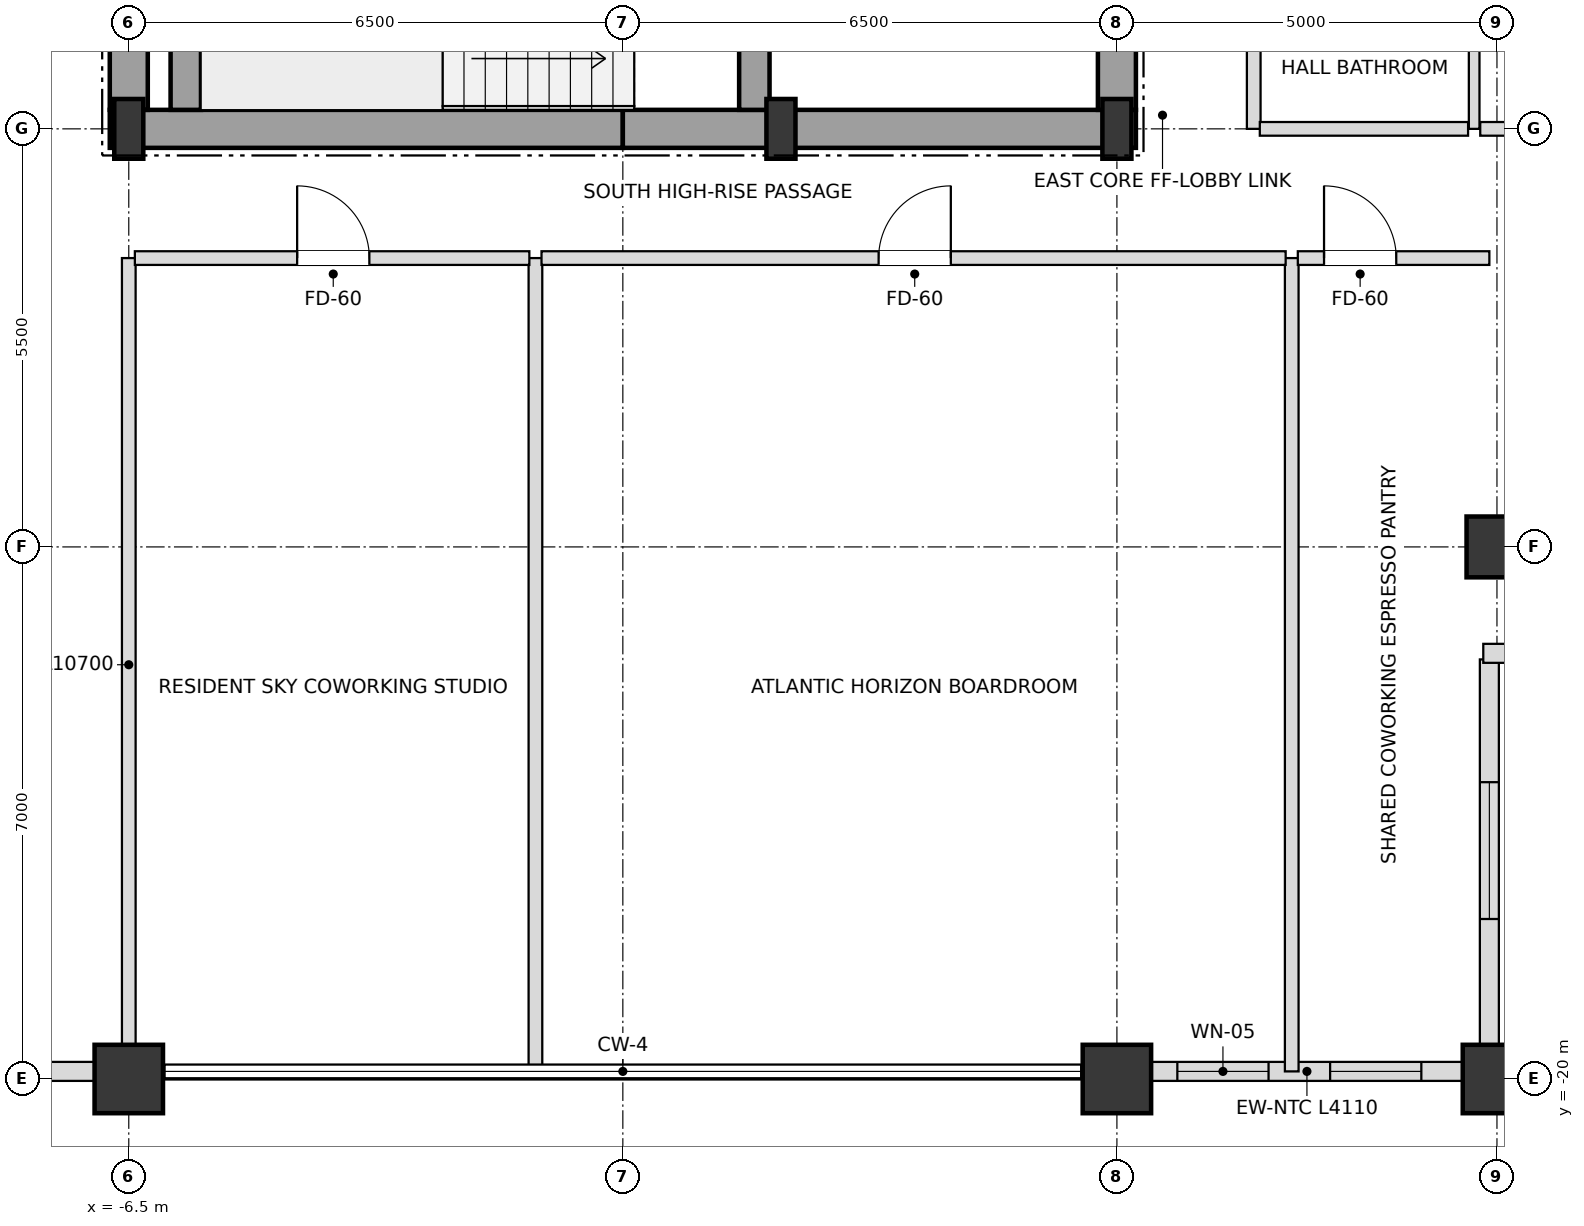
"""IFC4 building model, lengths in metres.
Left out: names, types, materials, properties, quantities, classifications, styles, units other than length and angle.
Written with IfcOpenShell. Run it as: python <this file> out.ifc"""

import sys

from ifc_helpers import new_model, si_unit, direction, frame, frame_2d, origin, origin_2d, place, context, subcontext, project, spatial, rectangle, i_section, extrude, element, fill, save


model = new_model("IFC4")
c1 = context("Model", 3, precision=1e-05, world=origin(), true_north=direction((0.0, 1.0)))
c2 = subcontext(c1, "Body", "Model", "MODEL_VIEW")
j1 = project(units=[si_unit("LENGTHUNIT", "METRE"), si_unit("PLANEANGLEUNIT", "RADIAN")], contexts=[c1])
p1 = place(None, origin())
s1 = spatial("IfcSite", under=j1, at=p1, CompositionType="ELEMENT")
p2 = place(p1, origin())
s2 = spatial("IfcBuilding", under=s1, at=p2, CompositionType="ELEMENT")
p3 = place(p2, frame((0.0, 0.0, 254.7)))
s3 = spatial("IfcBuildingStorey", under=s2, at=p3, CompositionType="ELEMENT", Elevation=254.7)
for number, where, z_axis, x_axis in (
    (1, (-6.5, -7.5, 0.0), (0.0, 0.0, 1.0), (1.0, 0.0, 0.0)),
    (2, (2.08, -7.5, 0.0), (0.0, 0.0, 1.0), (1.0, 0.0, 0.0)),
    (3, (6.5, -7.5, 0.0), (0.0, 0.0, 1.0), (1.0, 0.0, 0.0)),
):
    element("IfcColumn", number, at=place(p3, frame(where, z_axis=z_axis, x_axis=x_axis)), inside=s3, PredefinedType="COLUMN", context=c2, shape_type="SweptSolid", body=[
        extrude(i_section(OverallWidth=0.382, OverallDepth=0.786, WebThickness=0.02, FlangeThickness=0.033, at=origin_2d()), origin(), (0.0, 0.0, 1.0), 3.6),
    ])
for number, where, z_axis, x_axis in (
    (4, (-6.5, -20.0, 0.0), (0.0, 0.0, 1.0), (1.0, 0.0, 0.0)),
    (5, (6.5, -20.0, 0.0), (0.0, 0.0, 1.0), (1.0, 0.0, 0.0)),
    (6, (11.5, -20.0, 0.0), (0.0, 0.0, 1.0), (1.0, 0.0, 0.0)),
):
    element("IfcColumn", number, at=place(p3, frame(where, z_axis=z_axis, x_axis=x_axis)), inside=s3, PredefinedType="USERDEFINED", context=c2, shape_type="SweptSolid", body=[
        extrude(rectangle(XDim=0.9, YDim=0.9, at=origin_2d()), origin(), (0.0, 0.0, 1.0), 3.6),
    ])
p4 = place(p3, frame((11.5, -13.0, 0.0), z_axis=(0.0, 0.0, 1.0), x_axis=(1.0, 0.0, 0.0)))
e7 = element("IfcColumn", 7, at=p4, inside=s3, PredefinedType="COLUMN", context=c2, shape_type="SweptSolid", body=[
    extrude(rectangle(XDim=0.8, YDim=0.8, at=origin_2d()), origin(), (0.0, 0.0, 1.0), 3.6),
])
p5 = place(p3, frame((-11.055, -19.9, 0.0), z_axis=(0.0, 0.0, 1.0), x_axis=(1.0, 0.0, 0.0)))
e8 = element("IfcWall", 8, at=p5, inside=s3, PredefinedType="SOLIDWALL", context=c2, shape_type="SweptSolid", body=[
    extrude(rectangle(XDim=4.11, YDim=0.25, at=frame_2d((2.055, 0.0))), origin(), (0.0, 0.0, 1.0), 2.748),
])
p6 = place(p5, frame((1.155, 0.0, 0.72)))
e9 = element("IfcOpeningElement", 9, at=p6, cuts=e8, PredefinedType="OPENING", context=c2, shape_type="SweptSolid", body=[
    extrude(rectangle(XDim=1.8, YDim=1.68, at=frame_2d((0.9, 0.84))), frame((0.0, 0.135, 0.0), z_axis=(0.0, -1.0, 0.0), x_axis=(1.0, 0.0, 0.0)), (0.0, 0.0, 1.0), 0.27),
])
p7 = place(p3, frame((6.945, -19.9, 0.0), z_axis=(0.0, 0.0, 1.0), x_axis=(1.0, 0.0, 0.0)))
e10 = element("IfcWall", 10, at=p7, inside=s3, PredefinedType="SOLIDWALL", context=c2, shape_type="SweptSolid", body=[
    extrude(rectangle(XDim=4.11, YDim=0.25, at=frame_2d((2.055, 0.0))), origin(), (0.0, 0.0, 1.0), 2.748),
])
p8 = place(p7, frame((0.35, 0.0, 0.72)))
e11 = element("IfcOpeningElement", 11, at=p8, cuts=e10, PredefinedType="OPENING", context=c2, shape_type="SweptSolid", body=[
    extrude(rectangle(XDim=1.2, YDim=1.68, at=frame_2d((0.6, 0.84))), frame((0.0, 0.135, 0.0), z_axis=(0.0, -1.0, 0.0), x_axis=(1.0, 0.0, 0.0)), (0.0, 0.0, 1.0), 0.27),
])
p9 = place(p7, frame((2.36, 0.0, 0.72)))
e12 = element("IfcOpeningElement", 12, at=p9, cuts=e10, PredefinedType="OPENING", context=c2, shape_type="SweptSolid", body=[
    extrude(rectangle(XDim=1.2, YDim=1.68, at=frame_2d((0.6, 0.84))), frame((0.0, 0.135, 0.0), z_axis=(0.0, -1.0, 0.0), x_axis=(1.0, 0.0, 0.0)), (0.0, 0.0, 1.0), 0.27),
])
p10 = place(p3, frame((11.4, -19.82, 0.0), z_axis=(0.0, 0.0, 1.0), x_axis=(0.0, 1.0, 0.0)))
e13 = element("IfcWall", 13, at=p10, inside=s3, PredefinedType="SOLIDWALL", context=c2, shape_type="SweptSolid", body=[
    extrude(rectangle(XDim=5.34, YDim=0.25, at=frame_2d((2.67, 0.0))), origin(), (0.0, 0.0, 1.0), 2.748),
])
p11 = place(p10, frame((1.925, 0.0, 0.72)))
e14 = element("IfcOpeningElement", 14, at=p11, cuts=e13, PredefinedType="OPENING", context=c2, shape_type="SweptSolid", body=[
    extrude(rectangle(XDim=1.8, YDim=1.68, at=frame_2d((0.9, 0.84))), frame((0.0, 0.135, 0.0), z_axis=(0.0, -1.0, 0.0), x_axis=(1.0, 0.0, 0.0)), (0.0, 0.0, 1.0), 0.27),
])
p12 = place(p3, frame((11.32, -14.4, 0.0), z_axis=(0.0, 0.0, 1.0), x_axis=(1.0, 0.0, 0.0)))
e15 = element("IfcWall", 15, at=p12, inside=s3, PredefinedType="SOLIDWALL", context=c2, shape_type="SweptSolid", body=[
    extrude(rectangle(XDim=5.66, YDim=0.25, at=frame_2d((2.83, 0.0))), origin(), (0.0, 0.0, 1.0), 2.748),
])
p13 = place(p12, frame((0.595, 0.0, 0.72)))
e16 = element("IfcOpeningElement", 16, at=p13, cuts=e15, PredefinedType="OPENING", context=c2, shape_type="SweptSolid", body=[
    extrude(rectangle(XDim=1.8, YDim=1.68, at=frame_2d((0.9, 0.84))), frame((0.0, 0.135, 0.0), z_axis=(0.0, -1.0, 0.0), x_axis=(1.0, 0.0, 0.0)), (0.0, 0.0, 1.0), 0.27),
])
p14 = place(p12, frame((3.265, 0.0, 0.72)))
e17 = element("IfcOpeningElement", 17, at=p14, cuts=e15, PredefinedType="OPENING", context=c2, shape_type="SweptSolid", body=[
    extrude(rectangle(XDim=1.8, YDim=1.68, at=frame_2d((0.9, 0.84))), frame((0.0, 0.135, 0.0), z_axis=(0.0, -1.0, 0.0), x_axis=(1.0, 0.0, 0.0)), (0.0, 0.0, 1.0), 0.27),
])
for number, where, z_axis, x_axis in (
    (18, (-6.75, -7.5, 0.0), (0.0, 0.0, 1.0), (1.0, 0.0, 0.0)),
    (19, (0.0, -7.5, 0.0), (0.0, 0.0, 1.0), (1.0, 0.0, 0.0)),
):
    element("IfcWall", number, at=place(p3, frame(where, z_axis=z_axis, x_axis=x_axis)), inside=s3, PredefinedType="SHEAR", context=c2, shape_type="SweptSolid", body=[
        extrude(rectangle(XDim=6.75, YDim=0.5, at=frame_2d((3.375, 0.0))), origin(), (0.0, 0.0, 1.0), 3.38),
    ])
p15 = place(p3, frame((-6.5, -7.25, 0.0), z_axis=(0.0, 0.0, 1.0), x_axis=(0.0, 1.0, 0.0)))
e20 = element("IfcWall", 20, at=p15, inside=s3, PredefinedType="SHEAR", context=c2, shape_type="SweptSolid", body=[
    extrude(rectangle(XDim=3.55, YDim=0.5, at=frame_2d((1.775, 0.0))), origin(), (0.0, 0.0, 1.0), 3.38),
])
p16 = place(p3, frame((6.5, -7.25, 0.0), z_axis=(0.0, 0.0, 1.0), x_axis=(0.0, 1.0, 0.0)))
e21 = element("IfcWall", 21, at=p16, inside=s3, PredefinedType="SHEAR", context=c2, shape_type="SweptSolid", body=[
    extrude(rectangle(XDim=5.75, YDim=0.5, at=frame_2d((2.875, 0.0))), origin(), (0.0, 0.0, 1.0), 3.38),
])
p17 = place(p16, frame((0.85, 0.0, 0.0)))
e22 = element("IfcOpeningElement", 22, at=p17, cuts=e21, PredefinedType="OPENING", context=c2, shape_type="SweptSolid", body=[
    extrude(rectangle(XDim=1.05, YDim=2.15, at=frame_2d((0.525, 1.075))), frame((0.0, 0.26, 0.0), z_axis=(0.0, -1.0, 0.0), x_axis=(1.0, 0.0, 0.0)), (0.0, 0.0, 1.0), 0.52),
])
p18 = place(p3, frame((-5.75, -7.25, 0.0), z_axis=(0.0, 0.0, 1.0), x_axis=(0.0, 1.0, 0.0)))
e23 = element("IfcWall", 23, at=p18, inside=s3, PredefinedType="SHEAR", context=c2, shape_type="SweptSolid", body=[
    extrude(rectangle(XDim=2.9, YDim=0.4, at=frame_2d((1.45, 0.0))), origin(), (0.0, 0.0, 1.0), 3.38),
])
p19 = place(p3, frame((1.73, -7.25, 0.0), z_axis=(0.0, 0.0, 1.0), x_axis=(0.0, 1.0, 0.0)))
e24 = element("IfcWall", 24, at=p19, inside=s3, PredefinedType="SHEAR", context=c2, shape_type="SweptSolid", body=[
    extrude(rectangle(XDim=3.3, YDim=0.4, at=frame_2d((1.65, 0.0))), origin(), (0.0, 0.0, 1.0), 3.38),
])
p20 = place(p19, frame((0.9, 0.0, 0.0)))
e25 = element("IfcOpeningElement", 25, at=p20, cuts=e24, PredefinedType="OPENING", context=c2, shape_type="SweptSolid", body=[
    extrude(rectangle(XDim=1.05, YDim=2.15, at=frame_2d((0.525, 1.075))), frame((0.0, 0.21, 0.0), z_axis=(0.0, -1.0, 0.0), x_axis=(1.0, 0.0, 0.0)), (0.0, 0.0, 1.0), 0.42),
])
p21 = place(p3, frame((-6.5, -19.9, 0.0), z_axis=(0.0, 0.0, 1.0), x_axis=(0.0, 1.0, 0.0)))
e26 = element("IfcWall", 26, at=p21, inside=s3, PredefinedType="PARTITIONING", context=c2, shape_type="SweptSolid", body=[
    extrude(rectangle(XDim=10.7, YDim=0.18, at=frame_2d((5.35, 0.0))), origin(), (0.0, 0.0, 1.0), 2.826),
])
p22 = place(p3, frame((-1.15, -19.9, 0.0), z_axis=(0.0, 0.0, 1.0), x_axis=(0.0, 1.0, 0.0)))
e27 = element("IfcWall", 27, at=p22, inside=s3, PredefinedType="PARTITIONING", context=c2, shape_type="SweptSolid", body=[
    extrude(rectangle(XDim=10.7, YDim=0.18, at=frame_2d((5.35, 0.0))), origin(), (0.0, 0.0, 1.0), 3.018),
])
p23 = place(p3, frame((8.3, -7.5, 0.0), z_axis=(0.0, 0.0, 1.0), x_axis=(0.0, 1.0, 0.0)))
e28 = element("IfcWall", 28, at=p23, inside=s3, PredefinedType="PARTITIONING", context=c2, shape_type="SweptSolid", body=[
    extrude(rectangle(XDim=15.0, YDim=0.18, at=frame_2d((7.5, 0.0))), origin(), (0.0, 0.0, 1.0), 3.38),
])
p24 = place(p23, frame((2.355, 0.0, 0.0)))
e29 = element("IfcOpeningElement", 29, at=p24, cuts=e28, PredefinedType="OPENING", context=c2, shape_type="SweptSolid", body=[
    extrude(rectangle(XDim=0.95, YDim=2.15, at=frame_2d((0.475, 1.075))), frame((0.0, 0.1, 0.0), z_axis=(0.0, -1.0, 0.0), x_axis=(1.0, 0.0, 0.0)), (0.0, 0.0, 1.0), 0.2),
])
p25 = place(p3, frame((8.8, -19.9, 0.0), z_axis=(0.0, 0.0, 1.0), x_axis=(0.0, 1.0, 0.0)))
e30 = element("IfcWall", 30, at=p25, inside=s3, PredefinedType="PARTITIONING", context=c2, shape_type="SweptSolid", body=[
    extrude(rectangle(XDim=10.7, YDim=0.18, at=frame_2d((5.35, 0.0))), origin(), (0.0, 0.0, 1.0), 2.826),
])
p26 = place(p3, frame((11.2, -7.5, 0.0), z_axis=(0.0, 0.0, 1.0), x_axis=(0.0, 1.0, 0.0)))
e31 = element("IfcWall", 31, at=p26, inside=s3, PredefinedType="PARTITIONING", context=c2, shape_type="SweptSolid", body=[
    extrude(rectangle(XDim=15.0, YDim=0.14, at=frame_2d((7.5, 0.0))), origin(), (0.0, 0.0, 1.0), 3.38),
])
p27 = place(p26, frame((3.475, 0.0, 0.0)))
e32 = element("IfcOpeningElement", 32, at=p27, cuts=e31, PredefinedType="OPENING", context=c2, shape_type="SweptSolid", body=[
    extrude(rectangle(XDim=0.95, YDim=2.1, at=frame_2d((0.475, 1.05))), frame((0.0, 0.08, 0.0), z_axis=(0.0, -1.0, 0.0), x_axis=(1.0, 0.0, 0.0)), (0.0, 0.0, 1.0), 0.16),
])
p28 = place(p3, frame((-6.42, -9.2, 0.0), z_axis=(0.0, 0.0, 1.0), x_axis=(1.0, 0.0, 0.0)))
e33 = element("IfcWall", 33, at=p28, inside=s3, PredefinedType="PARTITIONING", context=c2, shape_type="SweptSolid", body=[
    extrude(rectangle(XDim=5.19, YDim=0.18, at=frame_2d((2.595, 0.0))), origin(), (0.0, 0.0, 1.0), 3.38),
])
p29 = place(p28, frame((2.135, 0.0, 0.0)))
e34 = element("IfcOpeningElement", 34, at=p29, cuts=e33, PredefinedType="OPENING", context=c2, shape_type="SweptSolid", body=[
    extrude(rectangle(XDim=0.95, YDim=2.15, at=frame_2d((0.475, 1.075))), frame((0.0, 0.1, 0.0), z_axis=(0.0, -1.0, 0.0), x_axis=(1.0, 0.0, 0.0)), (0.0, 0.0, 1.0), 0.2),
])
p30 = place(p3, frame((-1.07, -9.2, 0.0), z_axis=(0.0, 0.0, 1.0), x_axis=(1.0, 0.0, 0.0)))
e35 = element("IfcWall", 35, at=p30, inside=s3, PredefinedType="PARTITIONING", context=c2, shape_type="SweptSolid", body=[
    extrude(rectangle(XDim=9.79, YDim=0.18, at=frame_2d((4.895, 0.0))), origin(), (0.0, 0.0, 1.0), 2.826),
])
p31 = place(p30, frame((4.435, 0.0, 0.0)))
e36 = element("IfcOpeningElement", 36, at=p31, cuts=e35, PredefinedType="OPENING", context=c2, shape_type="SweptSolid", body=[
    extrude(rectangle(XDim=0.95, YDim=2.15, at=frame_2d((0.475, 1.075))), frame((0.0, 0.1, 0.0), z_axis=(0.0, -1.0, 0.0), x_axis=(1.0, 0.0, 0.0)), (0.0, 0.0, 1.0), 0.2),
])
p32 = place(p3, frame((8.88, -9.2, 0.0), z_axis=(0.0, 0.0, 1.0), x_axis=(1.0, 0.0, 0.0)))
e37 = element("IfcWall", 37, at=p32, inside=s3, PredefinedType="PARTITIONING", context=c2, shape_type="SweptSolid", body=[
    extrude(rectangle(XDim=2.52, YDim=0.18, at=frame_2d((1.26, 0.0))), origin(), (0.0, 0.0, 1.0), 3.38),
])
p33 = place(p32, frame((0.345, 0.0, 0.0)))
e38 = element("IfcOpeningElement", 38, at=p33, cuts=e37, PredefinedType="OPENING", context=c2, shape_type="SweptSolid", body=[
    extrude(rectangle(XDim=0.95, YDim=2.15, at=frame_2d((0.475, 1.075))), frame((0.0, 0.1, 0.0), z_axis=(0.0, -1.0, 0.0), x_axis=(1.0, 0.0, 0.0)), (0.0, 0.0, 1.0), 0.2),
])
p34 = place(p3, frame((8.38, -7.5, 0.0), z_axis=(0.0, 0.0, 1.0), x_axis=(1.0, 0.0, 0.0)))
e39 = element("IfcWall", 39, at=p34, inside=s3, PredefinedType="PARTITIONING", context=c2, shape_type="SweptSolid", body=[
    extrude(rectangle(XDim=2.74, YDim=0.18, at=frame_2d((1.37, 0.0))), origin(), (0.0, 0.0, 1.0), 2.826),
])
p35 = place(p3, frame((11.28, -7.5, 0.0), z_axis=(0.0, 0.0, 1.0), x_axis=(1.0, 0.0, 0.0)))
e40 = element("IfcWall", 40, at=p35, inside=s3, PredefinedType="PARTITIONING", context=c2, shape_type="SweptSolid", body=[
    extrude(rectangle(XDim=5.62, YDim=0.18, at=frame_2d((2.81, 0.0))), origin(), (0.0, 0.0, 1.0), 2.826),
])
p36 = place(p8, origin())
e41 = element("IfcWindow", 41, at=p36, inside=s3, PartitioningType="SINGLE_PANEL", PredefinedType="WINDOW", context=c2, shape_type="SweptSolid", body=[
    extrude(rectangle(XDim=1.2, YDim=1.68, at=frame_2d((0.6, 0.84))), frame((0.0, 0.03, 0.0), z_axis=(0.0, -1.0, 0.0), x_axis=(1.0, 0.0, 0.0)), (0.0, 0.0, 1.0), 0.06),
])
fill(e11, e41)
p37 = place(p9, origin())
e42 = element("IfcWindow", 42, at=p37, inside=s3, PartitioningType="SINGLE_PANEL", PredefinedType="WINDOW", context=c2, shape_type="SweptSolid", body=[
    extrude(rectangle(XDim=1.2, YDim=1.68, at=frame_2d((0.6, 0.84))), frame((0.0, 0.03, 0.0), z_axis=(0.0, -1.0, 0.0), x_axis=(1.0, 0.0, 0.0)), (0.0, 0.0, 1.0), 0.06),
])
fill(e12, e42)
p38 = place(p11, origin())
e43 = element("IfcWindow", 43, at=p38, inside=s3, PartitioningType="SINGLE_PANEL", PredefinedType="WINDOW", context=c2, shape_type="SweptSolid", body=[
    extrude(rectangle(XDim=1.8, YDim=1.68, at=frame_2d((0.9, 0.84))), frame((0.0, 0.03, 0.0), z_axis=(0.0, -1.0, 0.0), x_axis=(1.0, 0.0, 0.0)), (0.0, 0.0, 1.0), 0.06),
])
fill(e14, e43)
p39 = place(p29, origin())
e44 = element("IfcDoor", 44, at=p39, inside=s3, OperationType="SINGLE_SWING_LEFT", PredefinedType="DOOR", context=c2, shape_type="SweptSolid", body=[
    extrude(rectangle(XDim=0.95, YDim=2.15, at=frame_2d((0.475, 1.075))), frame((0.0, 0.025, 0.0), z_axis=(0.0, -1.0, 0.0), x_axis=(1.0, 0.0, 0.0)), (0.0, 0.0, 1.0), 0.05),
])
fill(e34, e44)
p40 = place(p31, origin())
e45 = element("IfcDoor", 45, at=p40, inside=s3, OperationType="SINGLE_SWING_RIGHT", PredefinedType="DOOR", context=c2, shape_type="SweptSolid", body=[
    extrude(rectangle(XDim=0.95, YDim=2.15, at=frame_2d((0.475, 1.075))), frame((0.0, 0.025, 0.0), z_axis=(0.0, -1.0, 0.0), x_axis=(1.0, 0.0, 0.0)), (0.0, 0.0, 1.0), 0.05),
])
fill(e36, e45)
p41 = place(p33, origin())
e46 = element("IfcDoor", 46, at=p41, inside=s3, OperationType="SINGLE_SWING_LEFT", PredefinedType="DOOR", context=c2, shape_type="SweptSolid", body=[
    extrude(rectangle(XDim=0.95, YDim=2.15, at=frame_2d((0.475, 1.075))), frame((0.0, 0.025, 0.0), z_axis=(0.0, -1.0, 0.0), x_axis=(1.0, 0.0, 0.0)), (0.0, 0.0, 1.0), 0.05),
])
fill(e38, e46)
save(model, sys.argv[1])
